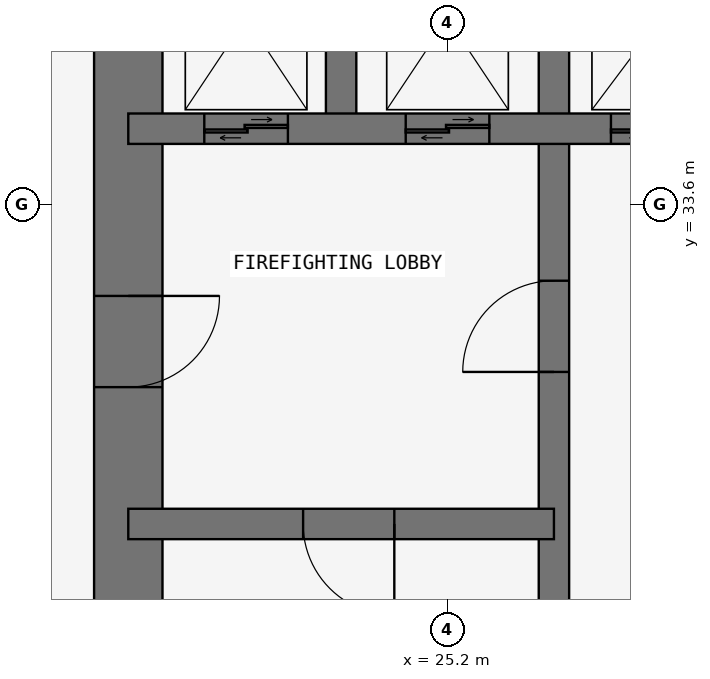
"""IFC4 building model, lengths in metres.
Left out: names, types, materials, properties, quantities, classifications, styles, units other than length and angle.
Written with IfcOpenShell. Run it as: python <this file> out.ifc"""

import sys

from ifc_helpers import new_model, si_unit, direction, frame, frame_2d, origin, place, context, subcontext, project, spatial, rectangle, extrude, element, fill, save


model = new_model("IFC4")
c1 = context("Model", 3, precision=1e-05, world=origin(), true_north=direction((0.0, 1.0)))
c2 = subcontext(c1, "Body", "Model", "MODEL_VIEW")
j1 = project(units=[si_unit("LENGTHUNIT", "METRE"), si_unit("PLANEANGLEUNIT", "RADIAN")], contexts=[c1])
p1 = place(None, origin())
s1 = spatial("IfcSite", under=j1, at=p1, CompositionType="ELEMENT")
p2 = place(p1, origin())
s2 = spatial("IfcBuilding", under=s1, at=p2, CompositionType="ELEMENT")
p3 = place(p2, frame((0.0, 0.0, 152.1)))
s3 = spatial("IfcBuildingStorey", under=s2, at=p3, CompositionType="ELEMENT", Elevation=152.1)
p4 = place(p3, frame((21.0, 37.8, 0.0), z_axis=(0.0, 0.0, 1.0), x_axis=(0.0, -1.0, 0.0)))
e1 = element("IfcWall", 1, at=p4, inside=s3, PredefinedType="SHEAR", context=c2, shape_type="SweptSolid", body=[
    extrude(rectangle(XDim=17.25, YDim=0.9, at=frame_2d((8.625, 0.0))), origin(), (0.0, 0.0, 1.0), 3.6),
])
p5 = place(p4, frame((5.4, 0.0, 0.0)))
e2 = element("IfcOpeningElement", 2, at=p5, cuts=e1, PredefinedType="OPENING", context=c2, shape_type="SweptSolid", body=[
    extrude(rectangle(XDim=1.2, YDim=2.1, at=frame_2d((0.6, 1.05))), frame((0.0, 0.46, 0.0), z_axis=(0.0, -1.0, 0.0), x_axis=(1.0, 0.0, 0.0)), (0.0, 0.0, 1.0), 0.92),
])
p6 = place(p3, frame((26.6, 21.0, 0.0), z_axis=(0.0, 0.0, 1.0), x_axis=(0.0, 1.0, 0.0)))
e3 = element("IfcWall", 3, at=p6, inside=s3, PredefinedType="SHEAR", context=c2, shape_type="SweptSolid", body=[
    extrude(rectangle(XDim=16.8, YDim=0.4, at=frame_2d((8.4, 0.0))), origin(), (0.0, 0.0, 1.0), 3.6),
])
p7 = place(p6, frame((10.4, 0.0, 0.0)))
e4 = element("IfcOpeningElement", 4, at=p7, cuts=e3, PredefinedType="OPENING", context=c2, shape_type="SweptSolid", body=[
    extrude(rectangle(XDim=1.2, YDim=2.1, at=frame_2d((0.6, 1.05))), frame((0.0, 0.21, 0.0), z_axis=(0.0, -1.0, 0.0), x_axis=(1.0, 0.0, 0.0)), (0.0, 0.0, 1.0), 0.42),
])
p8 = place(p3, frame((21.0, 29.4, 0.0), z_axis=(0.0, 0.0, 1.0), x_axis=(1.0, 0.0, 0.0)))
e5 = element("IfcWall", 5, at=p8, inside=s3, PredefinedType="SHEAR", context=c2, shape_type="SweptSolid", body=[
    extrude(rectangle(XDim=5.6, YDim=0.4, at=frame_2d((2.8, 0.0))), origin(), (0.0, 0.0, 1.0), 3.6),
])
p9 = place(p8, frame((2.3, 0.0, 0.0)))
e6 = element("IfcOpeningElement", 6, at=p9, cuts=e5, PredefinedType="OPENING", context=c2, shape_type="SweptSolid", body=[
    extrude(rectangle(XDim=1.2, YDim=2.1, at=frame_2d((0.6, 1.05))), frame((0.0, 0.21, 0.0), z_axis=(0.0, -1.0, 0.0), x_axis=(1.0, 0.0, 0.0)), (0.0, 0.0, 1.0), 0.42),
])
p10 = place(p3, frame((21.0, 34.6, 0.0), z_axis=(0.0, 0.0, 1.0), x_axis=(1.0, 0.0, 0.0)))
e7 = element("IfcWall", 7, at=p10, inside=s3, PredefinedType="SHEAR", context=c2, shape_type="SweptSolid", body=[
    extrude(rectangle(XDim=11.2, YDim=0.4, at=frame_2d((5.6, 0.0))), origin(), (0.0, 0.0, 1.0), 3.6),
])
p11 = place(p10, frame((9.35, 0.0, 0.0)))
e8 = element("IfcOpeningElement", 8, at=p11, cuts=e7, PredefinedType="OPENING", context=c2, shape_type="SweptSolid", body=[
    extrude(rectangle(XDim=0.9, YDim=2.1, at=frame_2d((0.45, 1.05))), frame((0.0, 0.21, 0.0), z_axis=(0.0, -1.0, 0.0), x_axis=(1.0, 0.0, 0.0)), (0.0, 0.0, 1.0), 0.42),
])
p12 = place(p10, frame((1.0, 0.0, 0.0)))
e9 = element("IfcOpeningElement", 9, at=p12, cuts=e7, PredefinedType="OPENING", context=c2, shape_type="SweptSolid", body=[
    extrude(rectangle(XDim=1.1, YDim=2.1, at=frame_2d((0.55, 1.05))), frame((0.0, 0.21, 0.0), z_axis=(0.0, -1.0, 0.0), x_axis=(1.0, 0.0, 0.0)), (0.0, 0.0, 1.0), 0.42),
])
p13 = place(p10, frame((3.65, 0.0, 0.0)))
e10 = element("IfcOpeningElement", 10, at=p13, cuts=e7, PredefinedType="OPENING", context=c2, shape_type="SweptSolid", body=[
    extrude(rectangle(XDim=1.1, YDim=2.1, at=frame_2d((0.55, 1.05))), frame((0.0, 0.21, 0.0), z_axis=(0.0, -1.0, 0.0), x_axis=(1.0, 0.0, 0.0)), (0.0, 0.0, 1.0), 0.42),
])
p14 = place(p10, frame((6.35, 0.0, 0.0)))
e11 = element("IfcOpeningElement", 11, at=p14, cuts=e7, PredefinedType="OPENING", context=c2, shape_type="SweptSolid", body=[
    extrude(rectangle(XDim=1.3, YDim=2.1, at=frame_2d((0.65, 1.05))), frame((0.0, 0.21, 0.0), z_axis=(0.0, -1.0, 0.0), x_axis=(1.0, 0.0, 0.0)), (0.0, 0.0, 1.0), 0.42),
])
p15 = place(p3, frame((23.8, 34.6, 0.0), z_axis=(0.0, 0.0, 1.0), x_axis=(0.0, 1.0, 0.0)))
e12 = element("IfcWall", 12, at=p15, inside=s3, PredefinedType="SHEAR", context=c2, shape_type="SweptSolid", body=[
    extrude(rectangle(XDim=3.2, YDim=0.4, at=frame_2d((1.6, 0.0))), origin(), (0.0, 0.0, 1.0), 3.6),
])
p16 = place(p5, origin())
e13 = element("IfcDoor", 13, at=p16, inside=s3, OperationType="SINGLE_SWING_LEFT", PredefinedType="DOOR", context=c2, shape_type="SweptSolid", body=[
    extrude(rectangle(XDim=1.2, YDim=2.1, at=frame_2d((0.6, 1.05))), frame((0.0, 0.025, 0.0), z_axis=(0.0, -1.0, 0.0), x_axis=(1.0, 0.0, 0.0)), (0.0, 0.0, 1.0), 0.05),
])
fill(e2, e13)
p17 = place(p9, frame((1.2, 0.0, 0.0), z_axis=(0.0, 0.0, 1.0), x_axis=(-1.0, 0.0, 0.0)))
e14 = element("IfcDoor", 14, at=p17, inside=s3, OperationType="SINGLE_SWING_LEFT", PredefinedType="DOOR", context=c2, shape_type="SweptSolid", body=[
    extrude(rectangle(XDim=1.2, YDim=2.1, at=frame_2d((0.6, 1.05))), frame((0.0, 0.025, 0.0), z_axis=(0.0, -1.0, 0.0), x_axis=(1.0, 0.0, 0.0)), (0.0, 0.0, 1.0), 0.05),
])
fill(e6, e14)
p18 = place(p7, origin())
e15 = element("IfcDoor", 15, at=p18, inside=s3, OperationType="SINGLE_SWING_LEFT", PredefinedType="DOOR", context=c2, shape_type="SweptSolid", body=[
    extrude(rectangle(XDim=1.2, YDim=2.1, at=frame_2d((0.6, 1.05))), frame((0.0, 0.025, 0.0), z_axis=(0.0, -1.0, 0.0), x_axis=(1.0, 0.0, 0.0)), (0.0, 0.0, 1.0), 0.05),
])
fill(e4, e15)
p19 = place(p12, origin())
e16 = element("IfcDoor", 16, at=p19, inside=s3, OperationType="DOUBLE_DOOR_SLIDING", PredefinedType="DOOR", context=c2, shape_type="SweptSolid", body=[
    extrude(rectangle(XDim=1.1, YDim=2.1, at=frame_2d((0.55, 1.05))), frame((0.0, 0.025, 0.0), z_axis=(0.0, -1.0, 0.0), x_axis=(1.0, 0.0, 0.0)), (0.0, 0.0, 1.0), 0.05),
])
fill(e9, e16)
p20 = place(p13, origin())
e17 = element("IfcDoor", 17, at=p20, inside=s3, OperationType="DOUBLE_DOOR_SLIDING", PredefinedType="DOOR", context=c2, shape_type="SweptSolid", body=[
    extrude(rectangle(XDim=1.1, YDim=2.1, at=frame_2d((0.55, 1.05))), frame((0.0, 0.025, 0.0), z_axis=(0.0, -1.0, 0.0), x_axis=(1.0, 0.0, 0.0)), (0.0, 0.0, 1.0), 0.05),
])
fill(e10, e17)
p21 = place(p14, origin())
e18 = element("IfcDoor", 18, at=p21, inside=s3, OperationType="DOUBLE_DOOR_SLIDING", PredefinedType="DOOR", context=c2, shape_type="SweptSolid", body=[
    extrude(rectangle(XDim=1.3, YDim=2.1, at=frame_2d((0.65, 1.05))), frame((0.0, 0.025, 0.0), z_axis=(0.0, -1.0, 0.0), x_axis=(1.0, 0.0, 0.0)), (0.0, 0.0, 1.0), 0.05),
])
fill(e11, e18)
save(model, sys.argv[1])
